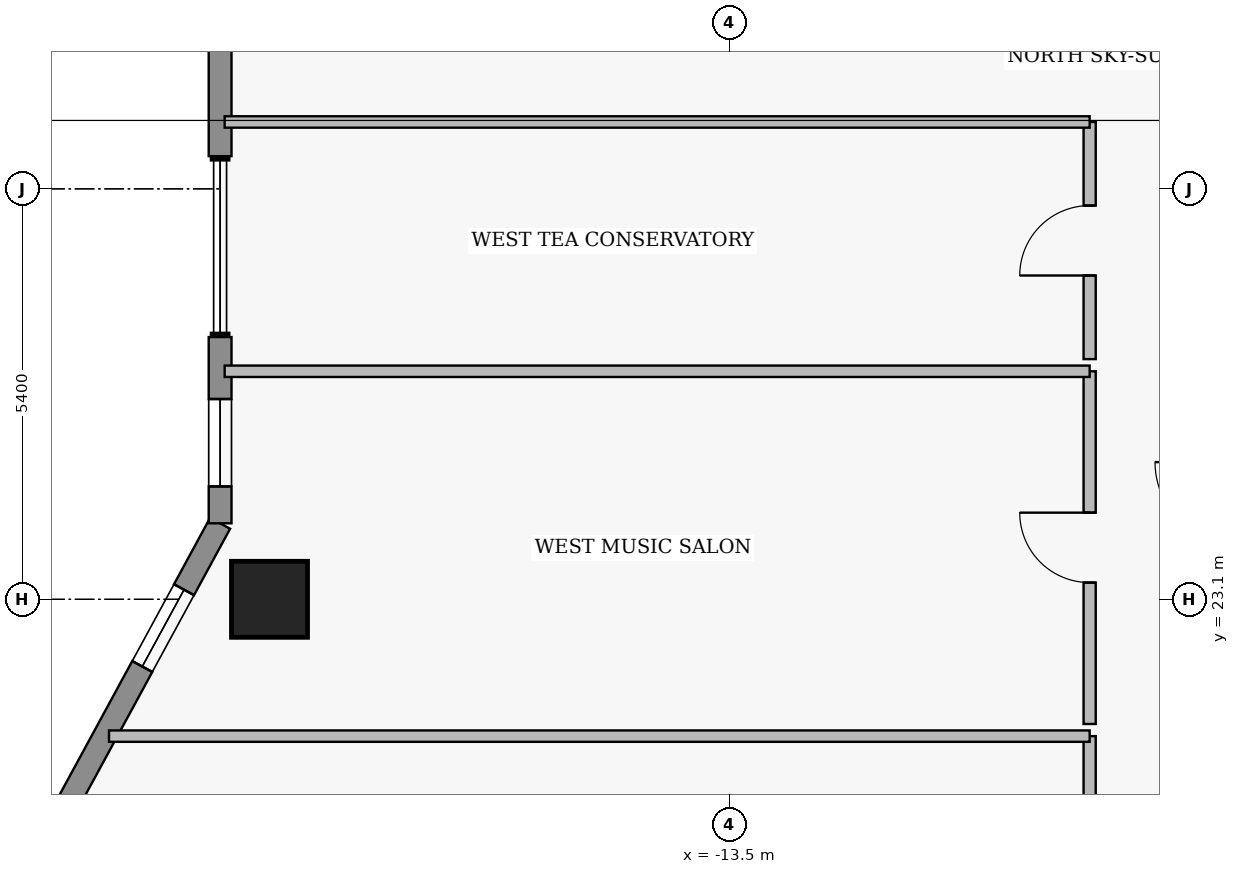
"""IFC4 building model, lengths in metres.
Left out: names, types, materials, properties, quantities, classifications, styles, units other than length and angle.
Written with IfcOpenShell. Run it as: python <this file> out.ifc"""

import sys

from ifc_helpers import new_model, si_unit, direction, frame, frame_2d, origin, origin_2d, place, context, subcontext, project, spatial, rectangle, extrude, element, fill, save


model = new_model("IFC4")
c1 = context("Model", 3, precision=1e-05, world=origin(), true_north=direction((0.0, 1.0)))
c2 = subcontext(c1, "Body", "Model", "MODEL_VIEW")
j1 = project(units=[si_unit("LENGTHUNIT", "METRE"), si_unit("PLANEANGLEUNIT", "RADIAN")], contexts=[c1])
p1 = place(None, origin())
s1 = spatial("IfcSite", under=j1, at=p1, CompositionType="ELEMENT")
p2 = place(p1, origin())
s2 = spatial("IfcBuilding", under=s1, at=p2, CompositionType="ELEMENT")
p3 = place(p2, frame((0.0, 0.0, 261.85)))
s3 = spatial("IfcBuildingStorey", under=s2, at=p3, CompositionType="ELEMENT", Elevation=261.85)
p4 = place(p3, frame((-19.55, 23.1, 0.0), z_axis=(0.0, 0.0, 1.0), x_axis=(1.0, 0.0, 0.0)))
e1 = element("IfcColumn", 1, at=p4, inside=s3, PredefinedType="COLUMN", context=c2, shape_type="SweptSolid", body=[
    extrude(rectangle(XDim=1.0, YDim=1.0, at=origin_2d()), origin(), (0.0, 0.0, 1.0), 3.7),
])
p5 = place(p3, frame((-22.7, 19.5, 0.0), z_axis=(0.0, 0.0, 1.0), x_axis=(0.477505494629, 0.878628762675, 0.0)))
e2 = element("IfcWall", 2, at=p5, inside=s3, PredefinedType="STANDARD", context=c2, shape_type="SweptSolid", body=[
    extrude(rectangle(XDim=5.236, YDim=0.3, at=frame_2d((2.618, 0.0))), origin(), (0.0, 0.0, 1.0), 3.48),
])
p6 = place(p5, frame((3.091, 0.0, 1.25)))
e3 = element("IfcOpeningElement", 3, at=p6, cuts=e2, PredefinedType="OPENING", context=c2, shape_type="SweptSolid", body=[
    extrude(rectangle(XDim=1.15, YDim=1.55, at=frame_2d((0.575, 0.775))), frame((0.0, 0.16, 0.0), z_axis=(0.0, -1.0, 0.0), x_axis=(1.0, 0.0, 0.0)), (0.0, 0.0, 1.0), 0.32),
])
p7 = place(p3, frame((-20.2, 24.1, 0.0), z_axis=(0.0, 0.0, 1.0), x_axis=(0.0, 1.0, 0.0)))
e4 = element("IfcWall", 4, at=p7, inside=s3, PredefinedType="STANDARD", context=c2, shape_type="SweptSolid", body=[
    extrude(rectangle(XDim=2.45, YDim=0.3, at=frame_2d((1.225, 0.0))), origin(), (0.0, 0.0, 1.0), 3.48),
])
p8 = place(p7, frame((0.485, 0.0, 0.95)))
e5 = element("IfcOpeningElement", 5, at=p8, cuts=e4, PredefinedType="OPENING", context=c2, shape_type="SweptSolid", body=[
    extrude(rectangle(XDim=1.15, YDim=1.55, at=frame_2d((0.575, 0.775))), frame((0.0, 0.16, 0.0), z_axis=(0.0, -1.0, 0.0), x_axis=(1.0, 0.0, 0.0)), (0.0, 0.0, 1.0), 0.32),
])
p9 = place(p3, frame((-20.2, 28.93, 0.0), z_axis=(0.0, 0.0, 1.0), x_axis=(0.0, 1.0, 0.0)))
e6 = element("IfcWall", 6, at=p9, inside=s3, PredefinedType="STANDARD", context=c2, shape_type="SweptSolid", body=[
    extrude(rectangle(XDim=6.67, YDim=0.3, at=frame_2d((3.335, 0.0))), origin(), (0.0, 0.0, 1.0), 3.48),
])
p10 = place(p9, frame((2.725, 0.0, 0.95)))
e7 = element("IfcOpeningElement", 7, at=p10, cuts=e6, PredefinedType="OPENING", context=c2, shape_type="SweptSolid", body=[
    extrude(rectangle(XDim=1.15, YDim=1.55, at=frame_2d((0.575, 0.775))), frame((0.0, 0.16, 0.0), z_axis=(0.0, -1.0, 0.0), x_axis=(1.0, 0.0, 0.0)), (0.0, 0.0, 1.0), 0.32),
])
p11 = place(p9, frame((4.94, 0.0, 0.95)))
e8 = element("IfcOpeningElement", 8, at=p11, cuts=e6, PredefinedType="OPENING", context=c2, shape_type="SweptSolid", body=[
    extrude(rectangle(XDim=1.15, YDim=1.55, at=frame_2d((0.575, 0.775))), frame((0.0, 0.16, 0.0), z_axis=(0.0, -1.0, 0.0), x_axis=(1.0, 0.0, 0.0)), (0.0, 0.0, 1.0), 0.32),
])
p12 = place(p3, frame((-8.76, 16.7, 0.0), z_axis=(0.0, 0.0, 1.0), x_axis=(0.0, 1.0, 0.0)))
e9 = element("IfcWall", 9, at=p12, inside=s3, PredefinedType="PARTITIONING", context=c2, shape_type="SweptSolid", body=[
    extrude(rectangle(XDim=4.6, YDim=0.16, at=frame_2d((2.3, 0.0))), origin(), (0.0, 0.0, 1.0), 3.48),
])
p13 = place(p12, frame((1.84, 0.0, 0.0)))
e10 = element("IfcOpeningElement", 10, at=p13, cuts=e9, PredefinedType="OPENING", context=c2, shape_type="SweptSolid", body=[
    extrude(rectangle(XDim=0.92, YDim=2.12, at=frame_2d((0.46, 1.06))), frame((0.0, 0.09, 0.0), z_axis=(0.0, -1.0, 0.0), x_axis=(1.0, 0.0, 0.0)), (0.0, 0.0, 1.0), 0.18),
])
p14 = place(p3, frame((-8.76, 21.46, 0.0), z_axis=(0.0, 0.0, 1.0), x_axis=(0.0, 1.0, 0.0)))
e11 = element("IfcWall", 11, at=p14, inside=s3, PredefinedType="PARTITIONING", context=c2, shape_type="SweptSolid", body=[
    extrude(rectangle(XDim=4.64, YDim=0.16, at=frame_2d((2.32, 0.0))), origin(), (0.0, 0.0, 1.0), 3.48),
])
p15 = place(p14, frame((1.86, 0.0, 0.0)))
e12 = element("IfcOpeningElement", 12, at=p15, cuts=e11, PredefinedType="OPENING", context=c2, shape_type="SweptSolid", body=[
    extrude(rectangle(XDim=0.92, YDim=2.12, at=frame_2d((0.46, 1.06))), frame((0.0, 0.09, 0.0), z_axis=(0.0, -1.0, 0.0), x_axis=(1.0, 0.0, 0.0)), (0.0, 0.0, 1.0), 0.18),
])
p16 = place(p3, frame((-8.76, 26.26, 0.0), z_axis=(0.0, 0.0, 1.0), x_axis=(0.0, 1.0, 0.0)))
e13 = element("IfcWall", 13, at=p16, inside=s3, PredefinedType="PARTITIONING", context=c2, shape_type="SweptSolid", body=[
    extrude(rectangle(XDim=3.12, YDim=0.16, at=frame_2d((1.56, 0.0))), origin(), (0.0, 0.0, 1.0), 3.48),
])
p17 = place(p16, frame((1.1, 0.0, 0.0)))
e14 = element("IfcOpeningElement", 14, at=p17, cuts=e13, PredefinedType="OPENING", context=c2, shape_type="SweptSolid", body=[
    extrude(rectangle(XDim=0.92, YDim=2.12, at=frame_2d((0.46, 1.06))), frame((0.0, 0.09, 0.0), z_axis=(0.0, -1.0, 0.0), x_axis=(1.0, 0.0, 0.0)), (0.0, 0.0, 1.0), 0.18),
])
p18 = place(p3, frame((-21.662, 21.3, 0.0), z_axis=(0.0, 0.0, 1.0), x_axis=(1.0, 0.0, 0.0)))
e15 = element("IfcWall", 15, at=p18, inside=s3, PredefinedType="PARTITIONING", context=c2, shape_type="SweptSolid", body=[
    extrude(rectangle(XDim=12.902, YDim=0.15, at=frame_2d((6.451, 0.0))), origin(), (0.0, 0.0, 1.0), 3.48),
])
for number, where, z_axis, x_axis in (
    (16, (-20.14, 26.1, 0.0), (0.0, 0.0, 1.0), (1.0, 0.0, 0.0)),
    (17, (-20.14, 29.38, 0.0), (0.0, 0.0, 1.0), (1.0, 0.0, 0.0)),
):
    element("IfcWall", number, at=place(p3, frame(where, z_axis=z_axis, x_axis=x_axis)), inside=s3, PredefinedType="PARTITIONING", context=c2, shape_type="SweptSolid", body=[
        extrude(rectangle(XDim=11.38, YDim=0.15, at=frame_2d((5.69, 0.0))), origin(), (0.0, 0.0, 1.0), 3.48),
    ])
p19 = place(p6, origin())
e18 = element("IfcWindow", 18, at=p19, inside=s3, PartitioningType="SINGLE_PANEL", PredefinedType="WINDOW", context=c2, shape_type="SweptSolid", body=[
    extrude(rectangle(XDim=1.15, YDim=1.55, at=frame_2d((0.575, 0.775))), frame((0.0, 0.03, 0.0), z_axis=(0.0, -1.0, 0.0), x_axis=(1.0, 0.0, 0.0)), (0.0, 0.0, 1.0), 0.06),
])
fill(e3, e18)
p20 = place(p8, origin())
e19 = element("IfcWindow", 19, at=p20, inside=s3, PartitioningType="SINGLE_PANEL", PredefinedType="WINDOW", context=c2, shape_type="SweptSolid", body=[
    extrude(rectangle(XDim=1.15, YDim=1.55, at=frame_2d((0.575, 0.775))), frame((0.0, 0.03, 0.0), z_axis=(0.0, -1.0, 0.0), x_axis=(1.0, 0.0, 0.0)), (0.0, 0.0, 1.0), 0.06),
])
fill(e5, e19)
p21 = place(p15, origin())
e20 = element("IfcDoor", 20, at=p21, inside=s3, OperationType="SINGLE_SWING_RIGHT", PredefinedType="DOOR", context=c2, shape_type="SweptSolid", body=[
    extrude(rectangle(XDim=0.92, YDim=2.12, at=frame_2d((0.46, 1.06))), frame((0.0, 0.025, 0.0), z_axis=(0.0, -1.0, 0.0), x_axis=(1.0, 0.0, 0.0)), (0.0, 0.0, 1.0), 0.05),
])
fill(e12, e20)
p22 = place(p17, origin())
e21 = element("IfcDoor", 21, at=p22, inside=s3, OperationType="SINGLE_SWING_LEFT", PredefinedType="DOOR", context=c2, shape_type="SweptSolid", body=[
    extrude(rectangle(XDim=0.92, YDim=2.12, at=frame_2d((0.46, 1.06))), frame((0.0, 0.025, 0.0), z_axis=(0.0, -1.0, 0.0), x_axis=(1.0, 0.0, 0.0)), (0.0, 0.0, 1.0), 0.05),
])
fill(e14, e21)
save(model, sys.argv[1])
